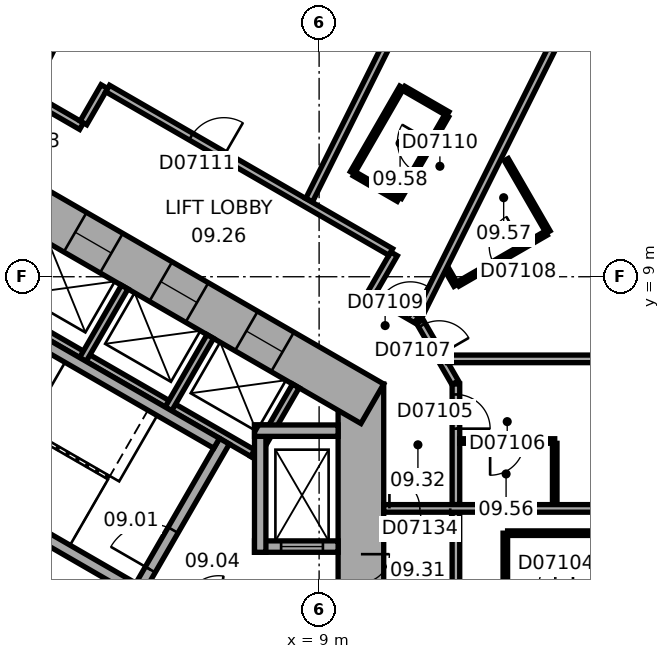
"""IFC4 building model, lengths in metres.
Left out: names, types, materials, properties, quantities, classifications, styles, units other than length and angle.
Written with IfcOpenShell. Run it as: python <this file> out.ifc"""

import sys

from ifc_helpers import new_model, si_unit, direction, frame, frame_2d, origin, place, context, subcontext, project, spatial, rectangle, extrude, element, fill, save


model = new_model("IFC4")
c1 = context("Model", 3, precision=1e-05, world=origin(), true_north=direction((0.0, 1.0)))
c2 = subcontext(c1, "Body", "Model", "MODEL_VIEW")
j1 = project(units=[si_unit("LENGTHUNIT", "METRE"), si_unit("PLANEANGLEUNIT", "RADIAN")], contexts=[c1])
p1 = place(None, origin())
s1 = spatial("IfcSite", under=j1, at=p1, CompositionType="ELEMENT")
p2 = place(p1, origin())
s2 = spatial("IfcBuilding", under=s1, at=p2, CompositionType="ELEMENT")
p3 = place(p2, frame((0.0, 0.0, 50.6)))
s3 = spatial("IfcBuildingStorey", under=s2, at=p3, CompositionType="ELEMENT", Elevation=50.6)
p4 = place(p3, frame((10.1, -6.177, 0.0), z_axis=(0.0, 0.0, 1.0), x_axis=(0.0, 1.0, 0.0)))
e1 = element("IfcWall", 1, at=p4, inside=s3, PredefinedType="SHEAR", context=c2, shape_type="SweptSolid", body=[
    extrude(rectangle(XDim=12.355, YDim=1.2, at=frame_2d((6.177, 0.0))), origin(), (0.0, 0.0, 1.0), 3.3),
])
p5 = place(p4, frame((6.378, 0.0, 0.0)))
e2 = element("IfcOpeningElement", 2, at=p5, cuts=e1, PredefinedType="OPENING", context=c2, shape_type="SweptSolid", body=[
    extrude(rectangle(XDim=1.5, YDim=2.1, at=frame_2d((0.75, 1.05))), frame((0.0, 0.61, 0.0), z_axis=(0.0, -1.0, 0.0), x_axis=(1.0, 0.0, 0.0)), (0.0, 0.0, 1.0), 1.22),
])
p6 = place(p4, frame((1.828, 0.0, 0.0)))
e3 = element("IfcOpeningElement", 3, at=p6, cuts=e1, PredefinedType="OPENING", context=c2, shape_type="SweptSolid", body=[
    extrude(rectangle(XDim=1.1, YDim=2.1, at=frame_2d((0.55, 1.05))), frame((0.0, 0.61, 0.0), z_axis=(0.0, -1.0, 0.0), x_axis=(1.0, 0.0, 0.0)), (0.0, 0.0, 1.0), 1.22),
])
p7 = place(p4, frame((4.427, 0.0, 0.0)))
e4 = element("IfcOpeningElement", 4, at=p7, cuts=e1, PredefinedType="OPENING", context=c2, shape_type="SweptSolid", body=[
    extrude(rectangle(XDim=1.1, YDim=2.1, at=frame_2d((0.55, 1.05))), frame((0.0, 0.61, 0.0), z_axis=(0.0, -1.0, 0.0), x_axis=(1.0, 0.0, 0.0)), (0.0, 0.0, 1.0), 1.22),
])
p8 = place(p3, frame((10.4, 5.658, 0.0), z_axis=(0.0, 0.0, 1.0), x_axis=(-0.866021384402, 0.500006961711, 0.0)))
e5 = element("IfcWall", 5, at=p8, inside=s3, PredefinedType="SHEAR", context=c2, shape_type="SweptSolid", body=[
    extrude(rectangle(XDim=12.355, YDim=1.2, at=frame_2d((6.178, 0.0))), origin(), (0.0, 0.0, 1.0), 3.3),
])
p9 = place(p8, frame((2.728, 0.0, 0.0)))
e6 = element("IfcOpeningElement", 6, at=p9, cuts=e5, PredefinedType="OPENING", context=c2, shape_type="SweptSolid", body=[
    extrude(rectangle(XDim=1.1, YDim=2.1, at=frame_2d((0.55, 1.05))), frame((0.0, 0.61, 0.0), z_axis=(0.0, -1.0, 0.0), x_axis=(1.0, 0.0, 0.0)), (0.0, 0.0, 1.0), 1.22),
])
p10 = place(p8, frame((5.328, 0.0, 0.0)))
e7 = element("IfcOpeningElement", 7, at=p10, cuts=e5, PredefinedType="OPENING", context=c2, shape_type="SweptSolid", body=[
    extrude(rectangle(XDim=1.1, YDim=2.1, at=frame_2d((0.55, 1.05))), frame((0.0, 0.61, 0.0), z_axis=(0.0, -1.0, 0.0), x_axis=(1.0, 0.0, 0.0)), (0.0, 0.0, 1.0), 1.22),
])
p11 = place(p8, frame((7.928, 0.0, 0.0)))
e8 = element("IfcOpeningElement", 8, at=p11, cuts=e5, PredefinedType="OPENING", context=c2, shape_type="SweptSolid", body=[
    extrude(rectangle(XDim=1.1, YDim=2.1, at=frame_2d((0.55, 1.05))), frame((0.0, 0.61, 0.0), z_axis=(0.0, -1.0, 0.0), x_axis=(1.0, 0.0, 0.0)), (0.0, 0.0, 1.0), 1.22),
])
p12 = place(p3, frame((7.424, 4.259, 0.0), z_axis=(0.0, 0.0, 1.0), x_axis=(-0.866026010844, 0.49999894854, 0.0)))
e9 = element("IfcWall", 9, at=p12, inside=s3, PredefinedType="PARTITIONING", context=c2, shape_type="SweptSolid", body=[
    extrude(rectangle(XDim=8.0, YDim=0.2, at=frame_2d((4.0, 0.0))), origin(), (0.0, 0.0, 1.0), 3.05),
])
for number, where, z_axis, x_axis in (
    (10, (7.287, 4.222, 0.0), (0.0, 0.0, 1.0), (0.5, 0.866, 0.0)),
    (11, (5.036, 5.522, 0.0), (0.0, 0.0, 1.0), (0.5, 0.866, 0.0)),
    (12, (2.784, 6.822, 0.0), (0.0, 0.0, 1.0), (0.5, 0.866, 0.0)),
):
    element("IfcWall", number, at=place(p3, frame(where, z_axis=z_axis, x_axis=x_axis)), inside=s3, PredefinedType="PARTITIONING", context=c2, shape_type="SweptSolid", body=[
        extrude(rectangle(XDim=2.2, YDim=0.2, at=frame_2d((1.1, 0.0))), origin(), (0.0, 0.0, 1.0), 3.05),
    ])
p13 = place(p3, frame((4.158, 0.602, 0.0), z_axis=(0.0, 0.0, 1.0), x_axis=(0.499977259774, 0.866038532462, 0.0)))
e13 = element("IfcWall", 13, at=p13, inside=s3, PredefinedType="SHEAR", context=c2, shape_type="SweptSolid", body=[
    extrude(rectangle(XDim=4.7, YDim=0.3, at=frame_2d((2.35, 0.0))), origin(), (0.0, 0.0, 1.0), 3.05),
])
p14 = place(p13, frame((0.8, 0.0, 0.0)))
e14 = element("IfcOpeningElement", 14, at=p14, cuts=e13, PredefinedType="OPENING", context=c2, shape_type="SweptSolid", body=[
    extrude(rectangle(XDim=1.2, YDim=2.1, at=frame_2d((0.6, 1.05))), frame((0.0, 0.16, 0.0), z_axis=(0.0, -1.0, 0.0), x_axis=(1.0, 0.0, 0.0)), (0.0, 0.0, 1.0), 0.32),
])
for number, where, z_axis, x_axis in (
    (15, (4.103, 0.807, 0.0), (0.0, 0.0, 1.0), (-0.866, 0.5, 0.0)),
    (16, (6.303, 4.617, 0.0), (0.0, 0.0, 1.0), (-0.866, 0.5, 0.0)),
):
    element("IfcWall", number, at=place(p3, frame(where, z_axis=z_axis, x_axis=x_axis)), inside=s3, PredefinedType="SHEAR", context=c2, shape_type="SweptSolid", body=[
        extrude(rectangle(XDim=7.06, YDim=0.3, at=frame_2d((3.53, 0.0))), origin(), (0.0, 0.0, 1.0), 3.05),
    ])
p15 = place(p3, frame((7.3, 1.9, 0.0), z_axis=(0.0, 0.0, 1.0), x_axis=(1.0, 0.0, 0.0)))
e17 = element("IfcWall", 17, at=p15, inside=s3, PredefinedType="SHEAR", context=c2, shape_type="SweptSolid", body=[
    extrude(rectangle(XDim=2.2, YDim=0.3, at=frame_2d((1.1, 0.0))), origin(), (0.0, 0.0, 1.0), 3.05),
])
p16 = place(p15, frame((0.7, 0.0, 0.0)))
e18 = element("IfcOpeningElement", 18, at=p16, cuts=e17, PredefinedType="OPENING", context=c2, shape_type="SweptSolid", body=[
    extrude(rectangle(XDim=1.1, YDim=2.1, at=frame_2d((0.55, 1.05))), frame((0.0, 0.16, 0.0), z_axis=(0.0, -1.0, 0.0), x_axis=(1.0, 0.0, 0.0)), (0.0, 0.0, 1.0), 0.32),
])
p17 = place(p3, frame((7.45, 1.75, 0.0), z_axis=(0.0, 0.0, 1.0), x_axis=(0.0, 1.0, 0.0)))
e19 = element("IfcWall", 19, at=p17, inside=s3, PredefinedType="SHEAR", context=c2, shape_type="SweptSolid", body=[
    extrude(rectangle(XDim=3.35, YDim=0.3, at=frame_2d((1.675, 0.0))), origin(), (0.0, 0.0, 1.0), 3.05),
])
p18 = place(p3, frame((7.3, 4.95, 0.0), z_axis=(0.0, 0.0, 1.0), x_axis=(1.0, 0.0, 0.0)))
e20 = element("IfcWall", 20, at=p18, inside=s3, PredefinedType="SHEAR", context=c2, shape_type="SweptSolid", body=[
    extrude(rectangle(XDim=2.2, YDim=0.3, at=frame_2d((1.1, 0.0))), origin(), (0.0, 0.0, 1.0), 3.05),
])
p19 = place(p3, frame((2.748, 12.962, 0.0), z_axis=(0.0, 0.0, 1.0), x_axis=(-0.866013897511, 0.50001992892, 0.0)))
e21 = element("IfcWall", 21, at=p19, inside=s3, PredefinedType="PARTITIONING", context=c2, shape_type="SweptSolid", body=[
    extrude(rectangle(XDim=2.037, YDim=0.2, at=frame_2d((1.018, 0.0))), origin(), (0.0, 0.0, 1.0), 3.05),
])
p20 = place(p3, frame((3.349, 14.002, 0.0), z_axis=(0.0, 0.0, 1.0), x_axis=(-0.500074377092, -0.865982457891, 0.0)))
e22 = element("IfcWall", 22, at=p20, inside=s3, PredefinedType="PARTITIONING", context=c2, shape_type="SweptSolid", body=[
    extrude(rectangle(XDim=1.101, YDim=0.2, at=frame_2d((0.55, 0.0))), origin(), (0.0, 0.0, 1.0), 3.05),
])
p21 = place(p3, frame((5.351, 21.859, 0.0), z_axis=(0.0, 0.0, 1.0), x_axis=(-0.446205309328, -0.894930624086, 0.0)))
e23 = element("IfcWall", 23, at=p21, inside=s3, PredefinedType="PARTITIONING", context=c2, shape_type="SweptSolid", body=[
    extrude(rectangle(XDim=8.913, YDim=0.2, at=frame_2d((4.457, 0.0))), origin(), (0.0, 0.0, 1.0), 2.6),
])
p22 = place(p3, frame((9.875, 11.736, 0.0), z_axis=(0.0, 0.0, 1.0), x_axis=(0.499936506574, 0.866062058628, 0.0)))
e24 = element("IfcWall", 24, at=p22, inside=s3, PredefinedType="PARTITIONING", context=c2, shape_type="SweptSolid", body=[
    extrude(rectangle(XDim=2.6, YDim=0.12, at=frame_2d((1.3, 0.0))), origin(), (0.0, 0.0, 1.0), 3.05),
])
p23 = place(p3, frame((10.371, 8.561, 0.0), z_axis=(0.0, 0.0, 1.0), x_axis=(0.499986357472, 0.866033280158, 0.0)))
e25 = element("IfcWall", 25, at=p23, inside=s3, PredefinedType="PARTITIONING", context=c2, shape_type="SweptSolid", body=[
    extrude(rectangle(XDim=1.201, YDim=0.2, at=frame_2d((0.601, 0.0))), origin(), (0.0, 0.0, 1.0), 3.05),
])
p24 = place(p3, frame((10.885, 9.652, 0.0), z_axis=(0.0, 0.0, 1.0), x_axis=(-0.866033868542, 0.499985338323, 0.0)))
e26 = element("IfcWall", 26, at=p24, inside=s3, PredefinedType="PARTITIONING", context=c2, shape_type="SweptSolid", body=[
    extrude(rectangle(XDim=8.602, YDim=0.2, at=frame_2d((4.301, 0.0))), origin(), (0.0, 0.0, 1.0), 3.05),
])
p25 = place(p24, frame((5.069, 0.0, 0.0)))
e27 = element("IfcOpeningElement", 27, at=p25, cuts=e26, PredefinedType="OPENING", context=c2, shape_type="SweptSolid", body=[
    extrude(rectangle(XDim=1.0, YDim=2.1, at=frame_2d((0.5, 1.05))), frame((0.0, 0.11, 0.0), z_axis=(0.0, -1.0, 0.0), x_axis=(1.0, 0.0, 0.0)), (0.0, 0.0, 1.0), 0.22),
])
for number, where, z_axis, x_axis in (
    (28, (11.087, 11.036, 0.0), (0.0, 0.0, 1.0), (-0.866, 0.5, 0.0)),
    (29, (11.226, 13.958, 0.0), (0.0, 0.0, 1.0), (0.866, -0.5, 0.0)),
):
    element("IfcWall", number, at=place(p3, frame(where, z_axis=z_axis, x_axis=x_axis)), inside=s3, PredefinedType="PARTITIONING", context=c2, shape_type="SweptSolid", body=[
        extrude(rectangle(XDim=1.34, YDim=0.12, at=frame_2d((0.67, 0.0))), origin(), (0.0, 0.0, 1.0), 3.05),
    ])
p26 = place(p3, frame((11.566, 7.871, 0.0), z_axis=(0.0, 0.0, 1.0), x_axis=(-0.866004557827, 0.500036104519, 0.0)))
e30 = element("IfcWall", 30, at=p26, inside=s3, PredefinedType="PARTITIONING", context=c2, shape_type="SweptSolid", body=[
    extrude(rectangle(XDim=1.28, YDim=0.2, at=frame_2d((0.64, 0.0))), origin(), (0.0, 0.0, 1.0), 3.05),
])
p27 = place(p26, frame((0.19, 0.0, 0.0)))
e31 = element("IfcOpeningElement", 31, at=p27, cuts=e30, PredefinedType="OPENING", context=c2, shape_type="SweptSolid", body=[
    extrude(rectangle(XDim=0.9, YDim=2.1, at=frame_2d((0.45, 1.05))), frame((0.0, 0.11, 0.0), z_axis=(0.0, -1.0, 0.0), x_axis=(1.0, 0.0, 0.0)), (0.0, 0.0, 1.0), 0.22),
])
p28 = place(p3, frame((12.357, 13.236, 0.0), z_axis=(0.0, 0.0, 1.0), x_axis=(-0.50000366821, -0.866023285932, 0.0)))
e32 = element("IfcWall", 32, at=p28, inside=s3, PredefinedType="PARTITIONING", context=c2, shape_type="SweptSolid", body=[
    extrude(rectangle(XDim=2.48, YDim=0.12, at=frame_2d((1.24, 0.0))), origin(), (0.0, 0.0, 1.0), 3.05),
])
p29 = place(p28, frame((0.79, 0.0, 0.0)))
e33 = element("IfcOpeningElement", 33, at=p29, cuts=e32, PredefinedType="OPENING", context=c2, shape_type="SweptSolid", body=[
    extrude(rectangle(XDim=0.9, YDim=2.1, at=frame_2d((0.45, 1.05))), frame((0.0, 0.07, 0.0), z_axis=(0.0, -1.0, 0.0), x_axis=(1.0, 0.0, 0.0)), (0.0, 0.0, 1.0), 0.14),
])
p30 = place(p3, frame((12.393, 18.348, 0.0), z_axis=(0.0, 0.0, 1.0), x_axis=(-0.446176022699, -0.894945225569, 0.0)))
e34 = element("IfcWall", 34, at=p30, inside=s3, PredefinedType="PARTITIONING", context=c2, shape_type="SweptSolid", body=[
    extrude(rectangle(XDim=8.191, YDim=0.2, at=frame_2d((4.095, 0.0))), origin(), (0.0, 0.0, 1.0), 2.6),
])
p31 = place(p3, frame((12.58, 6.212, 0.0), z_axis=(0.0, 0.0, 1.0), x_axis=(-0.500063286585, 0.865988862174, 0.0)))
e35 = element("IfcWall", 35, at=p31, inside=s3, PredefinedType="PARTITIONING", context=c2, shape_type="SweptSolid", body=[
    extrude(rectangle(XDim=1.86, YDim=0.2, at=frame_2d((0.93, 0.0))), origin(), (0.0, 0.0, 1.0), 3.05),
])
p32 = place(p31, frame((0.842, 0.0, 0.0)))
e36 = element("IfcOpeningElement", 36, at=p32, cuts=e35, PredefinedType="OPENING", context=c2, shape_type="SweptSolid", body=[
    extrude(rectangle(XDim=0.9, YDim=2.1, at=frame_2d((0.45, 1.05))), frame((0.0, 0.11, 0.0), z_axis=(0.0, -1.0, 0.0), x_axis=(1.0, 0.0, 0.0)), (0.0, 0.0, 1.0), 0.22),
])
p33 = place(p3, frame((12.6, 0.201, 0.0), z_axis=(0.0, 0.0, 1.0), x_axis=(0.0, 1.0, 0.0)))
e37 = element("IfcWall", 37, at=p33, inside=s3, PredefinedType="PARTITIONING", context=c2, shape_type="SweptSolid", body=[
    extrude(rectangle(XDim=2.604, YDim=0.2, at=frame_2d((1.302, 0.0))), origin(), (0.0, 0.0, 1.0), 3.05),
])
p34 = place(p3, frame((12.6, 3.004, 0.0), z_axis=(0.0, 0.0, 1.0), x_axis=(0.0, 1.0, 0.0)))
e38 = element("IfcWall", 38, at=p34, inside=s3, PredefinedType="PARTITIONING", context=c2, shape_type="SweptSolid", body=[
    extrude(rectangle(XDim=3.173, YDim=0.2, at=frame_2d((1.586, 0.0))), origin(), (0.0, 0.0, 1.0), 3.05),
])
p35 = place(p34, frame((1.998, 0.0, 0.0)))
e39 = element("IfcOpeningElement", 39, at=p35, cuts=e38, PredefinedType="OPENING", context=c2, shape_type="SweptSolid", body=[
    extrude(rectangle(XDim=0.9, YDim=2.1, at=frame_2d((0.45, 1.05))), frame((0.0, 0.11, 0.0), z_axis=(0.0, -1.0, 0.0), x_axis=(1.0, 0.0, 0.0)), (0.0, 0.0, 1.0), 0.22),
])
p36 = place(p3, frame((12.601, 8.776, 0.0), z_axis=(0.0, 0.0, 1.0), x_axis=(-0.500166486798, 0.865929261247, 0.0)))
e40 = element("IfcWall", 40, at=p36, inside=s3, PredefinedType="PARTITIONING", context=c2, shape_type="SweptSolid", body=[
    extrude(rectangle(XDim=0.476, YDim=0.12, at=frame_2d((0.238, 0.0))), origin(), (0.0, 0.0, 1.0), 3.05),
])
p37 = place(p3, frame((12.7, 4.677, 0.0), z_axis=(0.0, 0.0, 1.0), x_axis=(1.0, 0.0, 0.0)))
e41 = element("IfcWall", 41, at=p37, inside=s3, PredefinedType="PARTITIONING", context=c2, shape_type="SweptSolid", body=[
    extrude(rectangle(XDim=2.5, YDim=0.12, at=frame_2d((1.25, 0.0))), origin(), (0.0, 0.0, 1.0), 3.05),
])
p38 = place(p37, frame((0.8, 0.0, 0.0)))
e42 = element("IfcOpeningElement", 42, at=p38, cuts=e41, PredefinedType="OPENING", context=c2, shape_type="SweptSolid", body=[
    extrude(rectangle(XDim=0.9, YDim=2.1, at=frame_2d((0.45, 1.05))), frame((0.0, 0.07, 0.0), z_axis=(0.0, -1.0, 0.0), x_axis=(1.0, 0.0, 0.0)), (0.0, 0.0, 1.0), 0.14),
])
p39 = place(p3, frame((13.9, 0.853, 0.0), z_axis=(0.0, 0.0, 1.0), x_axis=(0.0, 1.0, 0.0)))
e43 = element("IfcWall", 43, at=p39, inside=s3, PredefinedType="PARTITIONING", context=c2, shape_type="SweptSolid", body=[
    extrude(rectangle(XDim=1.4, YDim=0.12, at=frame_2d((0.7, 0.0))), origin(), (0.0, 0.0, 1.0), 3.05),
])
p40 = place(p3, frame((13.926, 12.081, 0.0), z_axis=(0.0, 0.0, 1.0), x_axis=(0.499994660107, -0.866028486751, 0.0)))
e44 = element("IfcWall", 44, at=p40, inside=s3, PredefinedType="PARTITIONING", context=c2, shape_type="SweptSolid", body=[
    extrude(rectangle(XDim=2.2, YDim=0.12, at=frame_2d((1.1, 0.0))), origin(), (0.0, 0.0, 1.0), 3.05),
])
p41 = place(p3, frame((13.96, 2.253, 0.0), z_axis=(0.0, 0.0, 1.0), x_axis=(1.0, 0.0, 0.0)))
e45 = element("IfcWall", 45, at=p41, inside=s3, PredefinedType="PARTITIONING", context=c2, shape_type="SweptSolid", body=[
    extrude(rectangle(XDim=2.54, YDim=0.12, at=frame_2d((1.27, 0.0))), origin(), (0.0, 0.0, 1.0), 3.05),
])
p42 = place(p3, frame((14.974, 10.146, 0.0), z_axis=(0.0, 0.0, 1.0), x_axis=(-0.86599746015, -0.500048396672, 0.0)))
e46 = element("IfcWall", 46, at=p42, inside=s3, PredefinedType="PARTITIONING", context=c2, shape_type="SweptSolid", body=[
    extrude(rectangle(XDim=2.68, YDim=0.12, at=frame_2d((1.34, 0.0))), origin(), (0.0, 0.0, 1.0), 3.05),
])
p43 = place(p42, frame((0.69, 0.0, 0.0)))
e47 = element("IfcOpeningElement", 47, at=p43, cuts=e46, PredefinedType="OPENING", context=c2, shape_type="SweptSolid", body=[
    extrude(rectangle(XDim=0.9, YDim=2.1, at=frame_2d((0.45, 1.05))), frame((0.0, 0.07, 0.0), z_axis=(0.0, -1.0, 0.0), x_axis=(1.0, 0.0, 0.0)), (0.0, 0.0, 1.0), 0.14),
])
p44 = place(p3, frame((15.2, 4.618, 0.0), z_axis=(0.0, 0.0, 1.0), x_axis=(0.0, -1.0, 0.0)))
e48 = element("IfcWall", 48, at=p44, inside=s3, PredefinedType="PARTITIONING", context=c2, shape_type="SweptSolid", body=[
    extrude(rectangle(XDim=1.613, YDim=0.12, at=frame_2d((0.807, 0.0))), origin(), (0.0, 0.0, 1.0), 3.05),
])
p45 = place(p3, frame((15.915, 16.592, 0.0), z_axis=(0.0, 0.0, 1.0), x_axis=(-0.446199736347, -0.894933402709, 0.0)))
e49 = element("IfcWall", 49, at=p45, inside=s3, PredefinedType="PARTITIONING", context=c2, shape_type="SweptSolid", body=[
    extrude(rectangle(XDim=9.635, YDim=0.2, at=frame_2d((4.817, 0.0))), origin(), (0.0, 0.0, 1.0), 3.05),
])
p46 = place(p3, frame((21.95, 2.905, 0.0), z_axis=(0.0, 0.0, 1.0), x_axis=(-1.0, 0.0, 0.0)))
e50 = element("IfcWall", 50, at=p46, inside=s3, PredefinedType="PARTITIONING", context=c2, shape_type="SweptSolid", body=[
    extrude(rectangle(XDim=11.25, YDim=0.2, at=frame_2d((5.625, 0.0))), origin(), (0.0, 0.0, 1.0), 3.05),
])
p47 = place(p46, frame((9.5, 0.0, 0.0)))
e51 = element("IfcOpeningElement", 51, at=p47, cuts=e50, PredefinedType="OPENING", context=c2, shape_type="SweptSolid", body=[
    extrude(rectangle(XDim=1.6, YDim=2.1, at=frame_2d((0.8, 1.05))), frame((0.0, 0.11, 0.0), z_axis=(0.0, -1.0, 0.0), x_axis=(1.0, 0.0, 0.0)), (0.0, 0.0, 1.0), 0.22),
])
p48 = place(p3, frame((21.95, 6.839, 0.0), z_axis=(0.0, 0.0, 1.0), x_axis=(-1.0, 0.0, 0.0)))
e52 = element("IfcWall", 52, at=p48, inside=s3, PredefinedType="PARTITIONING", context=c2, shape_type="SweptSolid", body=[
    extrude(rectangle(XDim=9.572, YDim=0.2, at=frame_2d((4.786, 0.0))), origin(), (0.0, 0.0, 1.0), 3.05),
])
p49 = place(p5, origin())
e53 = element("IfcDoor", 53, at=p49, inside=s3, OperationType="DOUBLE_DOOR_SINGLE_SWING", PredefinedType="DOOR", context=c2, shape_type="SweptSolid", body=[
    extrude(rectangle(XDim=1.5, YDim=2.1, at=frame_2d((0.75, 1.05))), frame((0.0, 0.025, 0.0), z_axis=(0.0, -1.0, 0.0), x_axis=(1.0, 0.0, 0.0)), (0.0, 0.0, 1.0), 0.05),
])
fill(e2, e53)
p50 = place(p14, origin())
e54 = element("IfcDoor", 54, at=p50, inside=s3, OperationType="SINGLE_SWING_RIGHT", PredefinedType="DOOR", context=c2, shape_type="SweptSolid", body=[
    extrude(rectangle(XDim=1.2, YDim=2.1, at=frame_2d((0.6, 1.05))), frame((0.0, 0.025, 0.0), z_axis=(0.0, -1.0, 0.0), x_axis=(1.0, 0.0, 0.0)), (0.0, 0.0, 1.0), 0.05),
])
fill(e14, e54)
p51 = place(p16, origin())
e55 = element("IfcDoor", 55, at=p51, inside=s3, OperationType="DOUBLE_DOOR_SLIDING", PredefinedType="DOOR", context=c2, shape_type="SweptSolid", body=[
    extrude(rectangle(XDim=1.1, YDim=2.1, at=frame_2d((0.55, 1.05))), frame((0.0, 0.025, 0.0), z_axis=(0.0, -1.0, 0.0), x_axis=(1.0, 0.0, 0.0)), (0.0, 0.0, 1.0), 0.05),
])
fill(e18, e55)
p52 = place(p9, origin())
e56 = element("IfcDoor", 56, at=p52, inside=s3, OperationType="DOUBLE_DOOR_SLIDING", PredefinedType="DOOR", context=c2, shape_type="SweptSolid", body=[
    extrude(rectangle(XDim=1.1, YDim=2.1, at=frame_2d((0.55, 1.05))), frame((0.0, 0.025, 0.0), z_axis=(0.0, -1.0, 0.0), x_axis=(1.0, 0.0, 0.0)), (0.0, 0.0, 1.0), 0.05),
])
fill(e6, e56)
p53 = place(p10, origin())
e57 = element("IfcDoor", 57, at=p53, inside=s3, OperationType="DOUBLE_DOOR_SLIDING", PredefinedType="DOOR", context=c2, shape_type="SweptSolid", body=[
    extrude(rectangle(XDim=1.1, YDim=2.1, at=frame_2d((0.55, 1.05))), frame((0.0, 0.025, 0.0), z_axis=(0.0, -1.0, 0.0), x_axis=(1.0, 0.0, 0.0)), (0.0, 0.0, 1.0), 0.05),
])
fill(e7, e57)
p54 = place(p11, origin())
e58 = element("IfcDoor", 58, at=p54, inside=s3, OperationType="DOUBLE_DOOR_SLIDING", PredefinedType="DOOR", context=c2, shape_type="SweptSolid", body=[
    extrude(rectangle(XDim=1.1, YDim=2.1, at=frame_2d((0.55, 1.05))), frame((0.0, 0.025, 0.0), z_axis=(0.0, -1.0, 0.0), x_axis=(1.0, 0.0, 0.0)), (0.0, 0.0, 1.0), 0.05),
])
fill(e8, e58)
p55 = place(p35, origin())
e59 = element("IfcDoor", 59, at=p55, inside=s3, OperationType="SINGLE_SWING_LEFT", PredefinedType="DOOR", context=c2, shape_type="SweptSolid", body=[
    extrude(rectangle(XDim=0.9, YDim=2.1, at=frame_2d((0.45, 1.05))), frame((0.0, 0.025, 0.0), z_axis=(0.0, -1.0, 0.0), x_axis=(1.0, 0.0, 0.0)), (0.0, 0.0, 1.0), 0.05),
])
fill(e39, e59)
p56 = place(p38, origin())
e60 = element("IfcDoor", 60, at=p56, inside=s3, OperationType="SINGLE_SWING_LEFT", PredefinedType="DOOR", context=c2, shape_type="SweptSolid", body=[
    extrude(rectangle(XDim=0.9, YDim=2.1, at=frame_2d((0.45, 1.05))), frame((0.0, 0.025, 0.0), z_axis=(0.0, -1.0, 0.0), x_axis=(1.0, 0.0, 0.0)), (0.0, 0.0, 1.0), 0.05),
])
fill(e42, e60)
p57 = place(p32, origin())
e61 = element("IfcDoor", 61, at=p57, inside=s3, OperationType="SINGLE_SWING_LEFT", PredefinedType="DOOR", context=c2, shape_type="SweptSolid", body=[
    extrude(rectangle(XDim=0.9, YDim=2.1, at=frame_2d((0.45, 1.05))), frame((0.0, 0.025, 0.0), z_axis=(0.0, -1.0, 0.0), x_axis=(1.0, 0.0, 0.0)), (0.0, 0.0, 1.0), 0.05),
])
fill(e36, e61)
p58 = place(p43, origin())
e62 = element("IfcDoor", 62, at=p58, inside=s3, OperationType="SINGLE_SWING_LEFT", PredefinedType="DOOR", context=c2, shape_type="SweptSolid", body=[
    extrude(rectangle(XDim=0.9, YDim=2.1, at=frame_2d((0.45, 1.05))), frame((0.0, 0.025, 0.0), z_axis=(0.0, -1.0, 0.0), x_axis=(1.0, 0.0, 0.0)), (0.0, 0.0, 1.0), 0.05),
])
fill(e47, e62)
p59 = place(p27, origin())
e63 = element("IfcDoor", 63, at=p59, inside=s3, OperationType="SINGLE_SWING_LEFT", PredefinedType="DOOR", context=c2, shape_type="SweptSolid", body=[
    extrude(rectangle(XDim=0.9, YDim=2.1, at=frame_2d((0.45, 1.05))), frame((0.0, 0.025, 0.0), z_axis=(0.0, -1.0, 0.0), x_axis=(1.0, 0.0, 0.0)), (0.0, 0.0, 1.0), 0.05),
])
fill(e31, e63)
p60 = place(p29, origin())
e64 = element("IfcDoor", 64, at=p60, inside=s3, OperationType="SINGLE_SWING_LEFT", PredefinedType="DOOR", context=c2, shape_type="SweptSolid", body=[
    extrude(rectangle(XDim=0.9, YDim=2.1, at=frame_2d((0.45, 1.05))), frame((0.0, 0.025, 0.0), z_axis=(0.0, -1.0, 0.0), x_axis=(1.0, 0.0, 0.0)), (0.0, 0.0, 1.0), 0.05),
])
fill(e33, e64)
p61 = place(p25, origin())
e65 = element("IfcDoor", 65, at=p61, inside=s3, OperationType="SINGLE_SWING_LEFT", PredefinedType="DOOR", context=c2, shape_type="SweptSolid", body=[
    extrude(rectangle(XDim=1.0, YDim=2.1, at=frame_2d((0.5, 1.05))), frame((0.0, 0.025, 0.0), z_axis=(0.0, -1.0, 0.0), x_axis=(1.0, 0.0, 0.0)), (0.0, 0.0, 1.0), 0.05),
])
fill(e27, e65)
p62 = place(p47, origin())
e66 = element("IfcDoor", 66, at=p62, inside=s3, OperationType="DOUBLE_DOOR_SINGLE_SWING", PredefinedType="DOOR", context=c2, shape_type="SweptSolid", body=[
    extrude(rectangle(XDim=1.6, YDim=2.1, at=frame_2d((0.8, 1.05))), frame((0.0, 0.025, 0.0), z_axis=(0.0, -1.0, 0.0), x_axis=(1.0, 0.0, 0.0)), (0.0, 0.0, 1.0), 0.05),
])
fill(e51, e66)
save(model, sys.argv[1])
